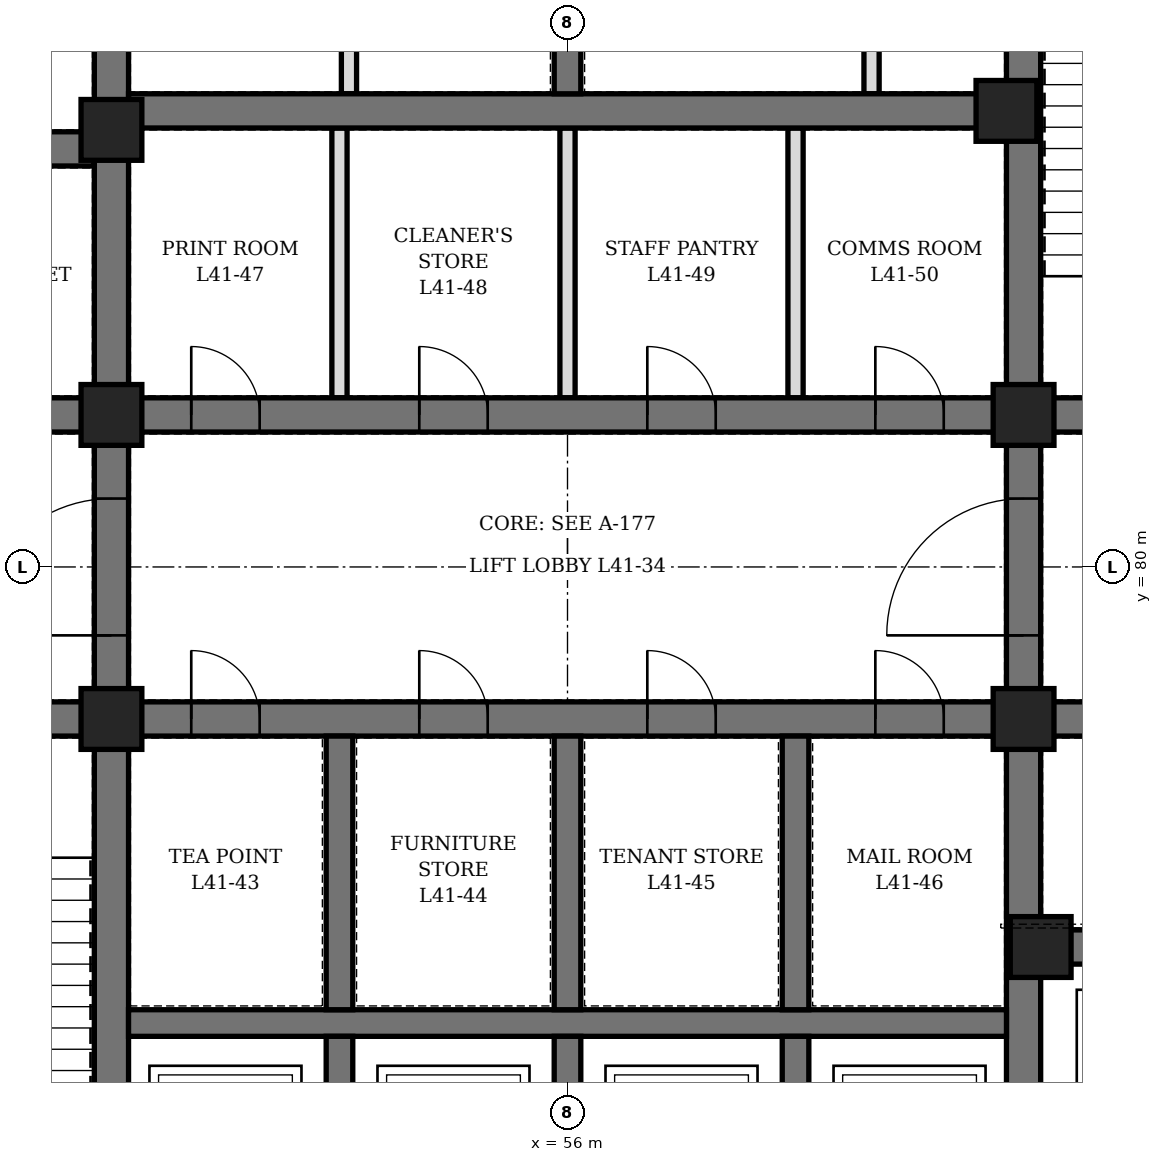
"""IFC4 building model, lengths in metres.
Left out: names, types, materials, properties, quantities, classifications, styles, units other than length and angle.
Written with IfcOpenShell. Run it as: python <this file> out.ifc"""

import sys

from ifc_helpers import new_model, si_unit, direction, frame, frame_2d, origin, origin_2d, place, context, subcontext, project, spatial, rectangle, hollow_rectangle, extrude, element, fill, save


model = new_model("IFC4")
c1 = context("Model", 3, precision=1e-05, world=origin(), true_north=direction((0.0, 1.0)))
c2 = subcontext(c1, "Body", "Model", "MODEL_VIEW")
j1 = project(units=[si_unit("LENGTHUNIT", "METRE"), si_unit("PLANEANGLEUNIT", "RADIAN")], contexts=[c1])
p1 = place(None, origin())
s1 = spatial("IfcSite", under=j1, at=p1, CompositionType="ELEMENT")
p2 = place(p1, origin())
s2 = spatial("IfcBuilding", under=s1, at=p2, CompositionType="ELEMENT")
p3 = place(p2, frame((0.0, 0.0, 185.5)))
s3 = spatial("IfcBuildingStorey", under=s2, at=p3, CompositionType="ELEMENT", Elevation=185.5)
p4 = place(p3, frame((50.0, 71.6, 0.0), z_axis=(0.0, 0.0, 1.0), x_axis=(0.0, 1.0, 0.0)))
e1 = element("IfcWall", 1, at=p4, inside=s3, PredefinedType="SHEAR", context=c2, shape_type="SweptSolid", body=[
    extrude(rectangle(XDim=16.8, YDim=0.45, at=frame_2d((8.4, 0.0))), origin(), (0.0, 0.0, 1.0), 4.2),
])
p5 = place(p4, frame((7.5, 0.0, 0.0)))
e2 = element("IfcOpeningElement", 2, at=p5, cuts=e1, PredefinedType="OPENING", context=c2, shape_type="SweptSolid", body=[
    extrude(rectangle(XDim=1.8, YDim=2.4, at=frame_2d((0.9, 1.2))), frame((0.0, 0.235, 0.0), z_axis=(0.0, -1.0, 0.0), x_axis=(1.0, 0.0, 0.0)), (0.0, 0.0, 1.0), 0.47),
])
p6 = place(p3, frame((62.0, 71.6, 0.0), z_axis=(0.0, 0.0, 1.0), x_axis=(0.0, 1.0, 0.0)))
e3 = element("IfcWall", 3, at=p6, inside=s3, PredefinedType="SHEAR", context=c2, shape_type="SweptSolid", body=[
    extrude(rectangle(XDim=16.8, YDim=0.45, at=frame_2d((8.4, 0.0))), origin(), (0.0, 0.0, 1.0), 4.2),
])
p7 = place(p6, frame((7.5, 0.0, 0.0)))
e4 = element("IfcOpeningElement", 4, at=p7, cuts=e3, PredefinedType="OPENING", context=c2, shape_type="SweptSolid", body=[
    extrude(rectangle(XDim=1.8, YDim=2.4, at=frame_2d((0.9, 1.2))), frame((0.0, 0.235, 0.0), z_axis=(0.0, -1.0, 0.0), x_axis=(1.0, 0.0, 0.0)), (0.0, 0.0, 1.0), 0.47),
])
p8 = place(p3, frame((44.6, 78.0, 0.0), z_axis=(0.0, 0.0, 1.0), x_axis=(1.0, 0.0, 0.0)))
e5 = element("IfcWall", 5, at=p8, inside=s3, PredefinedType="SHEAR", context=c2, shape_type="SweptSolid", body=[
    extrude(rectangle(XDim=5.175, YDim=0.45, at=frame_2d((2.587, 0.0))), origin(), (0.0, 0.0, 1.0), 4.2),
])
p9 = place(p8, frame((1.8, 0.0, 0.0)))
e6 = element("IfcOpeningElement", 6, at=p9, cuts=e5, PredefinedType="OPENING", context=c2, shape_type="SweptSolid", body=[
    extrude(rectangle(XDim=1.2, YDim=2.1, at=frame_2d((0.6, 1.05))), frame((0.0, 0.235, 0.0), z_axis=(0.0, -1.0, 0.0), x_axis=(1.0, 0.0, 0.0)), (0.0, 0.0, 1.0), 0.47),
])
p10 = place(p3, frame((44.6, 82.0, 0.0), z_axis=(0.0, 0.0, 1.0), x_axis=(1.0, 0.0, 0.0)))
e7 = element("IfcWall", 7, at=p10, inside=s3, PredefinedType="SHEAR", context=c2, shape_type="SweptSolid", body=[
    extrude(rectangle(XDim=5.175, YDim=0.45, at=frame_2d((2.587, 0.0))), origin(), (0.0, 0.0, 1.0), 4.2),
])
p11 = place(p10, frame((0.7, 0.0, 0.0)))
e8 = element("IfcOpeningElement", 8, at=p11, cuts=e7, PredefinedType="OPENING", context=c2, shape_type="SweptSolid", body=[
    extrude(rectangle(XDim=0.9, YDim=2.1, at=frame_2d((0.45, 1.05))), frame((0.0, 0.235, 0.0), z_axis=(0.0, -1.0, 0.0), x_axis=(1.0, 0.0, 0.0)), (0.0, 0.0, 1.0), 0.47),
])
p12 = place(p3, frame((44.6, 85.5, 0.0), z_axis=(0.0, 0.0, 1.0), x_axis=(1.0, 0.0, 0.0)))
e9 = element("IfcWall", 9, at=p12, inside=s3, PredefinedType="SHEAR", context=c2, shape_type="SweptSolid", body=[
    extrude(rectangle(XDim=5.175, YDim=0.45, at=frame_2d((2.587, 0.0))), origin(), (0.0, 0.0, 1.0), 4.2),
])
p13 = place(p12, frame((0.7, 0.0, 0.0)))
e10 = element("IfcOpeningElement", 10, at=p13, cuts=e9, PredefinedType="OPENING", context=c2, shape_type="SweptSolid", body=[
    extrude(rectangle(XDim=0.9, YDim=2.1, at=frame_2d((0.45, 1.05))), frame((0.0, 0.235, 0.0), z_axis=(0.0, -1.0, 0.0), x_axis=(1.0, 0.0, 0.0)), (0.0, 0.0, 1.0), 0.47),
])
p14 = place(p3, frame((62.225, 75.0, 0.0), z_axis=(0.0, 0.0, 1.0), x_axis=(1.0, 0.0, 0.0)))
e11 = element("IfcWall", 11, at=p14, inside=s3, PredefinedType="SHEAR", context=c2, shape_type="SweptSolid", body=[
    extrude(rectangle(XDim=5.175, YDim=0.45, at=frame_2d((2.587, 0.0))), origin(), (0.0, 0.0, 1.0), 4.2),
])
p15 = place(p14, frame((0.675, 0.0, 0.0)))
e12 = element("IfcOpeningElement", 12, at=p15, cuts=e11, PredefinedType="OPENING", context=c2, shape_type="SweptSolid", body=[
    extrude(rectangle(XDim=1.2, YDim=2.2, at=frame_2d((0.6, 1.1))), frame((0.0, 0.235, 0.0), z_axis=(0.0, -1.0, 0.0), x_axis=(1.0, 0.0, 0.0)), (0.0, 0.0, 1.0), 0.47),
])
p16 = place(p14, frame((3.425, 0.0, 0.0)))
e13 = element("IfcOpeningElement", 13, at=p16, cuts=e11, PredefinedType="OPENING", context=c2, shape_type="SweptSolid", body=[
    extrude(rectangle(XDim=1.2, YDim=2.2, at=frame_2d((0.6, 1.1))), frame((0.0, 0.235, 0.0), z_axis=(0.0, -1.0, 0.0), x_axis=(1.0, 0.0, 0.0)), (0.0, 0.0, 1.0), 0.47),
])
p17 = place(p3, frame((62.225, 78.0, 0.0), z_axis=(0.0, 0.0, 1.0), x_axis=(1.0, 0.0, 0.0)))
e14 = element("IfcWall", 14, at=p17, inside=s3, PredefinedType="SHEAR", context=c2, shape_type="SweptSolid", body=[
    extrude(rectangle(XDim=5.175, YDim=0.45, at=frame_2d((2.587, 0.0))), origin(), (0.0, 0.0, 1.0), 4.2),
])
p18 = place(p17, frame((2.175, 0.0, 0.0)))
e15 = element("IfcOpeningElement", 15, at=p18, cuts=e14, PredefinedType="OPENING", context=c2, shape_type="SweptSolid", body=[
    extrude(rectangle(XDim=1.2, YDim=2.1, at=frame_2d((0.6, 1.05))), frame((0.0, 0.235, 0.0), z_axis=(0.0, -1.0, 0.0), x_axis=(1.0, 0.0, 0.0)), (0.0, 0.0, 1.0), 0.47),
])
p19 = place(p3, frame((62.225, 82.0, 0.0), z_axis=(0.0, 0.0, 1.0), x_axis=(1.0, 0.0, 0.0)))
e16 = element("IfcWall", 16, at=p19, inside=s3, PredefinedType="SHEAR", context=c2, shape_type="SweptSolid", body=[
    extrude(rectangle(XDim=5.175, YDim=0.45, at=frame_2d((2.587, 0.0))), origin(), (0.0, 0.0, 1.0), 4.2),
])
p20 = place(p19, frame((2.175, 0.0, 0.0)))
e17 = element("IfcOpeningElement", 17, at=p20, cuts=e16, PredefinedType="OPENING", context=c2, shape_type="SweptSolid", body=[
    extrude(rectangle(XDim=1.2, YDim=2.1, at=frame_2d((0.6, 1.05))), frame((0.0, 0.235, 0.0), z_axis=(0.0, -1.0, 0.0), x_axis=(1.0, 0.0, 0.0)), (0.0, 0.0, 1.0), 0.47),
])
p21 = place(p3, frame((50.225, 78.0, 0.0), z_axis=(0.0, 0.0, 1.0), x_axis=(1.0, 0.0, 0.0)))
e18 = element("IfcWall", 18, at=p21, inside=s3, PredefinedType="SHEAR", context=c2, shape_type="SweptSolid", body=[
    extrude(rectangle(XDim=11.55, YDim=0.45, at=frame_2d((5.775, 0.0))), origin(), (0.0, 0.0, 1.0), 4.2),
])
p22 = place(p21, frame((0.825, 0.0, 0.0)))
e19 = element("IfcOpeningElement", 19, at=p22, cuts=e18, PredefinedType="OPENING", context=c2, shape_type="SweptSolid", body=[
    extrude(rectangle(XDim=0.9, YDim=2.1, at=frame_2d((0.45, 1.05))), frame((0.0, 0.235, 0.0), z_axis=(0.0, -1.0, 0.0), x_axis=(1.0, 0.0, 0.0)), (0.0, 0.0, 1.0), 0.47),
])
p23 = place(p21, frame((3.825, 0.0, 0.0)))
e20 = element("IfcOpeningElement", 20, at=p23, cuts=e18, PredefinedType="OPENING", context=c2, shape_type="SweptSolid", body=[
    extrude(rectangle(XDim=0.9, YDim=2.1, at=frame_2d((0.45, 1.05))), frame((0.0, 0.235, 0.0), z_axis=(0.0, -1.0, 0.0), x_axis=(1.0, 0.0, 0.0)), (0.0, 0.0, 1.0), 0.47),
])
p24 = place(p21, frame((6.825, 0.0, 0.0)))
e21 = element("IfcOpeningElement", 21, at=p24, cuts=e18, PredefinedType="OPENING", context=c2, shape_type="SweptSolid", body=[
    extrude(rectangle(XDim=0.9, YDim=2.1, at=frame_2d((0.45, 1.05))), frame((0.0, 0.235, 0.0), z_axis=(0.0, -1.0, 0.0), x_axis=(1.0, 0.0, 0.0)), (0.0, 0.0, 1.0), 0.47),
])
p25 = place(p21, frame((9.825, 0.0, 0.0)))
e22 = element("IfcOpeningElement", 22, at=p25, cuts=e18, PredefinedType="OPENING", context=c2, shape_type="SweptSolid", body=[
    extrude(rectangle(XDim=0.9, YDim=2.1, at=frame_2d((0.45, 1.05))), frame((0.0, 0.235, 0.0), z_axis=(0.0, -1.0, 0.0), x_axis=(1.0, 0.0, 0.0)), (0.0, 0.0, 1.0), 0.47),
])
p26 = place(p3, frame((50.225, 82.0, 0.0), z_axis=(0.0, 0.0, 1.0), x_axis=(1.0, 0.0, 0.0)))
e23 = element("IfcWall", 23, at=p26, inside=s3, PredefinedType="SHEAR", context=c2, shape_type="SweptSolid", body=[
    extrude(rectangle(XDim=11.55, YDim=0.45, at=frame_2d((5.775, 0.0))), origin(), (0.0, 0.0, 1.0), 4.2),
])
p27 = place(p26, frame((0.825, 0.0, 0.0)))
e24 = element("IfcOpeningElement", 24, at=p27, cuts=e23, PredefinedType="OPENING", context=c2, shape_type="SweptSolid", body=[
    extrude(rectangle(XDim=0.9, YDim=2.1, at=frame_2d((0.45, 1.05))), frame((0.0, 0.235, 0.0), z_axis=(0.0, -1.0, 0.0), x_axis=(1.0, 0.0, 0.0)), (0.0, 0.0, 1.0), 0.47),
])
p28 = place(p26, frame((3.825, 0.0, 0.0)))
e25 = element("IfcOpeningElement", 25, at=p28, cuts=e23, PredefinedType="OPENING", context=c2, shape_type="SweptSolid", body=[
    extrude(rectangle(XDim=0.9, YDim=2.1, at=frame_2d((0.45, 1.05))), frame((0.0, 0.235, 0.0), z_axis=(0.0, -1.0, 0.0), x_axis=(1.0, 0.0, 0.0)), (0.0, 0.0, 1.0), 0.47),
])
p29 = place(p26, frame((6.825, 0.0, 0.0)))
e26 = element("IfcOpeningElement", 26, at=p29, cuts=e23, PredefinedType="OPENING", context=c2, shape_type="SweptSolid", body=[
    extrude(rectangle(XDim=0.9, YDim=2.1, at=frame_2d((0.45, 1.05))), frame((0.0, 0.235, 0.0), z_axis=(0.0, -1.0, 0.0), x_axis=(1.0, 0.0, 0.0)), (0.0, 0.0, 1.0), 0.47),
])
p30 = place(p26, frame((9.825, 0.0, 0.0)))
e27 = element("IfcOpeningElement", 27, at=p30, cuts=e23, PredefinedType="OPENING", context=c2, shape_type="SweptSolid", body=[
    extrude(rectangle(XDim=0.9, YDim=2.1, at=frame_2d((0.45, 1.05))), frame((0.0, 0.235, 0.0), z_axis=(0.0, -1.0, 0.0), x_axis=(1.0, 0.0, 0.0)), (0.0, 0.0, 1.0), 0.47),
])
p31 = place(p3, frame((50.225, 86.0, 0.0), z_axis=(0.0, 0.0, 1.0), x_axis=(1.0, 0.0, 0.0)))
e28 = element("IfcWall", 28, at=p31, inside=s3, PredefinedType="SHEAR", context=c2, shape_type="SweptSolid", body=[
    extrude(rectangle(XDim=11.55, YDim=0.45, at=frame_2d((5.775, 0.0))), origin(), (0.0, 0.0, 1.0), 4.2),
])
p32 = place(p3, frame((50.225, 74.0, 0.0), z_axis=(0.0, 0.0, 1.0), x_axis=(1.0, 0.0, 0.0)))
e29 = element("IfcWall", 29, at=p32, inside=s3, PredefinedType="SHEAR", context=c2, shape_type="SweptSolid", body=[
    extrude(rectangle(XDim=11.55, YDim=0.35, at=frame_2d((5.775, 0.0))), origin(), (0.0, 0.0, 1.0), 4.2),
])
p33 = place(p3, frame((53.0, 71.6, 0.0), z_axis=(0.0, 0.0, 1.0), x_axis=(0.0, 1.0, 0.0)))
e30 = element("IfcWall", 30, at=p33, inside=s3, PredefinedType="SHEAR", context=c2, shape_type="SweptSolid", body=[
    extrude(rectangle(XDim=2.225, YDim=0.35, at=frame_2d((1.112, 0.0))), origin(), (0.0, 0.0, 1.0), 4.2),
])
p34 = place(p3, frame((53.0, 74.175, 0.0), z_axis=(0.0, 0.0, 1.0), x_axis=(0.0, 1.0, 0.0)))
e31 = element("IfcWall", 31, at=p34, inside=s3, PredefinedType="SHEAR", context=c2, shape_type="SweptSolid", body=[
    extrude(rectangle(XDim=3.6, YDim=0.35, at=frame_2d((1.8, 0.0))), origin(), (0.0, 0.0, 1.0), 4.2),
])
p35 = place(p3, frame((56.0, 71.6, 0.0), z_axis=(0.0, 0.0, 1.0), x_axis=(0.0, 1.0, 0.0)))
e32 = element("IfcWall", 32, at=p35, inside=s3, PredefinedType="SHEAR", context=c2, shape_type="SweptSolid", body=[
    extrude(rectangle(XDim=2.225, YDim=0.35, at=frame_2d((1.112, 0.0))), origin(), (0.0, 0.0, 1.0), 4.2),
])
p36 = place(p3, frame((56.0, 74.175, 0.0), z_axis=(0.0, 0.0, 1.0), x_axis=(0.0, 1.0, 0.0)))
e33 = element("IfcWall", 33, at=p36, inside=s3, PredefinedType="SHEAR", context=c2, shape_type="SweptSolid", body=[
    extrude(rectangle(XDim=3.6, YDim=0.35, at=frame_2d((1.8, 0.0))), origin(), (0.0, 0.0, 1.0), 4.2),
])
p37 = place(p3, frame((59.0, 71.6, 0.0), z_axis=(0.0, 0.0, 1.0), x_axis=(0.0, 1.0, 0.0)))
e34 = element("IfcWall", 34, at=p37, inside=s3, PredefinedType="SHEAR", context=c2, shape_type="SweptSolid", body=[
    extrude(rectangle(XDim=2.225, YDim=0.35, at=frame_2d((1.112, 0.0))), origin(), (0.0, 0.0, 1.0), 4.2),
])
p38 = place(p3, frame((59.0, 74.175, 0.0), z_axis=(0.0, 0.0, 1.0), x_axis=(0.0, 1.0, 0.0)))
e35 = element("IfcWall", 35, at=p38, inside=s3, PredefinedType="SHEAR", context=c2, shape_type="SweptSolid", body=[
    extrude(rectangle(XDim=3.6, YDim=0.35, at=frame_2d((1.8, 0.0))), origin(), (0.0, 0.0, 1.0), 4.2),
])
p39 = place(p3, frame((56.0, 86.225, 0.0), z_axis=(0.0, 0.0, 1.0), x_axis=(0.0, 1.0, 0.0)))
e36 = element("IfcWall", 36, at=p39, inside=s3, PredefinedType="SHEAR", context=c2, shape_type="SweptSolid", body=[
    extrude(rectangle(XDim=2.175, YDim=0.35, at=frame_2d((1.087, 0.0))), origin(), (0.0, 0.0, 1.0), 4.2),
])
for number, where, z_axis, x_axis in (
    (37, (50.0, 78.0, 0.0), (0.0, 0.0, 1.0), (1.0, 0.0, 0.0)),
    (38, (50.0, 82.0, 0.0), (0.0, 0.0, 1.0), (1.0, 0.0, 0.0)),
    (39, (50.0, 85.75, 0.0), (0.0, 0.0, 1.0), (1.0, 0.0, 0.0)),
    (40, (61.775, 86.0, 0.0), (0.0, 0.0, 1.0), (1.0, 0.0, 0.0)),
    (41, (62.0, 78.0, 0.0), (0.0, 0.0, 1.0), (1.0, 0.0, 0.0)),
    (42, (62.0, 82.0, 0.0), (0.0, 0.0, 1.0), (1.0, 0.0, 0.0)),
    (43, (62.225, 75.0, 0.0), (0.0, 0.0, 1.0), (1.0, 0.0, 0.0)),
):
    element("IfcColumn", number, at=place(p3, frame(where, z_axis=z_axis, x_axis=x_axis)), inside=s3, PredefinedType="COLUMN", context=c2, shape_type="SweptSolid", body=[
        extrude(hollow_rectangle(XDim=0.8, YDim=0.8, WallThickness=0.1, at=origin_2d()), origin(), (0.0, 0.0, 1.0), 4.2),
    ])
p40 = place(p3, frame((53.125, 86.225, 0.0), z_axis=(0.0, 0.0, 1.0), x_axis=(0.0, 1.0, 0.0)))
e44 = element("IfcWall", 44, at=p40, inside=s3, PredefinedType="PARTITIONING", context=c2, shape_type="SweptSolid", body=[
    extrude(rectangle(XDim=2.175, YDim=0.2, at=frame_2d((1.087, 0.0))), origin(), (0.0, 0.0, 1.0), 4.04),
])
p41 = place(p3, frame((60.0, 86.225, 0.0), z_axis=(0.0, 0.0, 1.0), x_axis=(0.0, 1.0, 0.0)))
e45 = element("IfcWall", 45, at=p41, inside=s3, PredefinedType="PARTITIONING", context=c2, shape_type="SweptSolid", body=[
    extrude(rectangle(XDim=2.175, YDim=0.2, at=frame_2d((1.087, 0.0))), origin(), (0.0, 0.0, 1.0), 4.04),
])
p42 = place(p41, frame((0.637, 0.0, 0.0)))
e46 = element("IfcOpeningElement", 46, at=p42, cuts=e45, PredefinedType="OPENING", context=c2, shape_type="SweptSolid", body=[
    extrude(rectangle(XDim=0.9, YDim=2.1, at=frame_2d((0.45, 1.05))), frame((0.0, 0.11, 0.0), z_axis=(0.0, -1.0, 0.0), x_axis=(1.0, 0.0, 0.0)), (0.0, 0.0, 1.0), 0.22),
])
p43 = place(p3, frame((53.0, 82.225, 0.0), z_axis=(0.0, 0.0, 1.0), x_axis=(0.0, 1.0, 0.0)))
e47 = element("IfcWall", 47, at=p43, inside=s3, PredefinedType="PARTITIONING", context=c2, shape_type="SweptSolid", body=[
    extrude(rectangle(XDim=3.55, YDim=0.2, at=frame_2d((1.775, 0.0))), origin(), (0.0, 0.0, 1.0), 4.04),
])
p44 = place(p3, frame((56.0, 82.225, 0.0), z_axis=(0.0, 0.0, 1.0), x_axis=(0.0, 1.0, 0.0)))
e48 = element("IfcWall", 48, at=p44, inside=s3, PredefinedType="PARTITIONING", context=c2, shape_type="SweptSolid", body=[
    extrude(rectangle(XDim=3.55, YDim=0.2, at=frame_2d((1.775, 0.0))), origin(), (0.0, 0.0, 1.0), 2.54),
])
p45 = place(p3, frame((59.0, 82.225, 0.0), z_axis=(0.0, 0.0, 1.0), x_axis=(0.0, 1.0, 0.0)))
e49 = element("IfcWall", 49, at=p45, inside=s3, PredefinedType="PARTITIONING", context=c2, shape_type="SweptSolid", body=[
    extrude(rectangle(XDim=3.55, YDim=0.2, at=frame_2d((1.775, 0.0))), origin(), (0.0, 0.0, 1.0), 4.04),
])
p46 = place(p22, origin())
e50 = element("IfcDoor", 50, at=p46, inside=s3, OperationType="SINGLE_SWING_LEFT", PredefinedType="DOOR", context=c2, shape_type="SweptSolid", body=[
    extrude(rectangle(XDim=0.9, YDim=2.1, at=frame_2d((0.45, 1.05))), frame((0.0, 0.225, 0.0), z_axis=(0.0, -1.0, 0.0), x_axis=(1.0, 0.0, 0.0)), (0.0, 0.0, 1.0), 0.449),
])
fill(e19, e50)
p47 = place(p23, origin())
e51 = element("IfcDoor", 51, at=p47, inside=s3, OperationType="SINGLE_SWING_LEFT", PredefinedType="DOOR", context=c2, shape_type="SweptSolid", body=[
    extrude(rectangle(XDim=0.9, YDim=2.1, at=frame_2d((0.45, 1.05))), frame((0.0, 0.225, 0.0), z_axis=(0.0, -1.0, 0.0), x_axis=(1.0, 0.0, 0.0)), (0.0, 0.0, 1.0), 0.449),
])
fill(e20, e51)
p48 = place(p24, origin())
e52 = element("IfcDoor", 52, at=p48, inside=s3, OperationType="SINGLE_SWING_LEFT", PredefinedType="DOOR", context=c2, shape_type="SweptSolid", body=[
    extrude(rectangle(XDim=0.9, YDim=2.1, at=frame_2d((0.45, 1.05))), frame((0.0, 0.225, 0.0), z_axis=(0.0, -1.0, 0.0), x_axis=(1.0, 0.0, 0.0)), (0.0, 0.0, 1.0), 0.449),
])
fill(e21, e52)
p49 = place(p25, origin())
e53 = element("IfcDoor", 53, at=p49, inside=s3, OperationType="SINGLE_SWING_LEFT", PredefinedType="DOOR", context=c2, shape_type="SweptSolid", body=[
    extrude(rectangle(XDim=0.9, YDim=2.1, at=frame_2d((0.45, 1.05))), frame((0.0, 0.225, 0.0), z_axis=(0.0, -1.0, 0.0), x_axis=(1.0, 0.0, 0.0)), (0.0, 0.0, 1.0), 0.449),
])
fill(e22, e53)
p50 = place(p27, origin())
e54 = element("IfcDoor", 54, at=p50, inside=s3, OperationType="SINGLE_SWING_LEFT", PredefinedType="DOOR", context=c2, shape_type="SweptSolid", body=[
    extrude(rectangle(XDim=0.9, YDim=2.1, at=frame_2d((0.45, 1.05))), frame((0.0, 0.225, 0.0), z_axis=(0.0, -1.0, 0.0), x_axis=(1.0, 0.0, 0.0)), (0.0, 0.0, 1.0), 0.449),
])
fill(e24, e54)
p51 = place(p28, origin())
e55 = element("IfcDoor", 55, at=p51, inside=s3, OperationType="SINGLE_SWING_LEFT", PredefinedType="DOOR", context=c2, shape_type="SweptSolid", body=[
    extrude(rectangle(XDim=0.9, YDim=2.1, at=frame_2d((0.45, 1.05))), frame((0.0, 0.225, 0.0), z_axis=(0.0, -1.0, 0.0), x_axis=(1.0, 0.0, 0.0)), (0.0, 0.0, 1.0), 0.449),
])
fill(e25, e55)
p52 = place(p29, origin())
e56 = element("IfcDoor", 56, at=p52, inside=s3, OperationType="SINGLE_SWING_LEFT", PredefinedType="DOOR", context=c2, shape_type="SweptSolid", body=[
    extrude(rectangle(XDim=0.9, YDim=2.1, at=frame_2d((0.45, 1.05))), frame((0.0, 0.225, 0.0), z_axis=(0.0, -1.0, 0.0), x_axis=(1.0, 0.0, 0.0)), (0.0, 0.0, 1.0), 0.449),
])
fill(e26, e56)
p53 = place(p30, origin())
e57 = element("IfcDoor", 57, at=p53, inside=s3, OperationType="SINGLE_SWING_LEFT", PredefinedType="DOOR", context=c2, shape_type="SweptSolid", body=[
    extrude(rectangle(XDim=0.9, YDim=2.1, at=frame_2d((0.45, 1.05))), frame((0.0, 0.225, 0.0), z_axis=(0.0, -1.0, 0.0), x_axis=(1.0, 0.0, 0.0)), (0.0, 0.0, 1.0), 0.449),
])
fill(e27, e57)
p54 = place(p5, origin())
e58 = element("IfcDoor", 58, at=p54, inside=s3, OperationType="DOUBLE_DOOR_SINGLE_SWING", PredefinedType="DOOR", context=c2, shape_type="SweptSolid", body=[
    extrude(rectangle(XDim=1.8, YDim=2.4, at=frame_2d((0.9, 1.2))), frame((0.0, 0.225, 0.0), z_axis=(0.0, -1.0, 0.0), x_axis=(1.0, 0.0, 0.0)), (0.0, 0.0, 1.0), 0.449),
])
fill(e2, e58)
p55 = place(p7, origin())
e59 = element("IfcDoor", 59, at=p55, inside=s3, OperationType="DOUBLE_DOOR_SINGLE_SWING", PredefinedType="DOOR", context=c2, shape_type="SweptSolid", body=[
    extrude(rectangle(XDim=1.8, YDim=2.4, at=frame_2d((0.9, 1.2))), frame((0.0, 0.225, 0.0), z_axis=(0.0, -1.0, 0.0), x_axis=(1.0, 0.0, 0.0)), (0.0, 0.0, 1.0), 0.449),
])
fill(e4, e59)
save(model, sys.argv[1])
